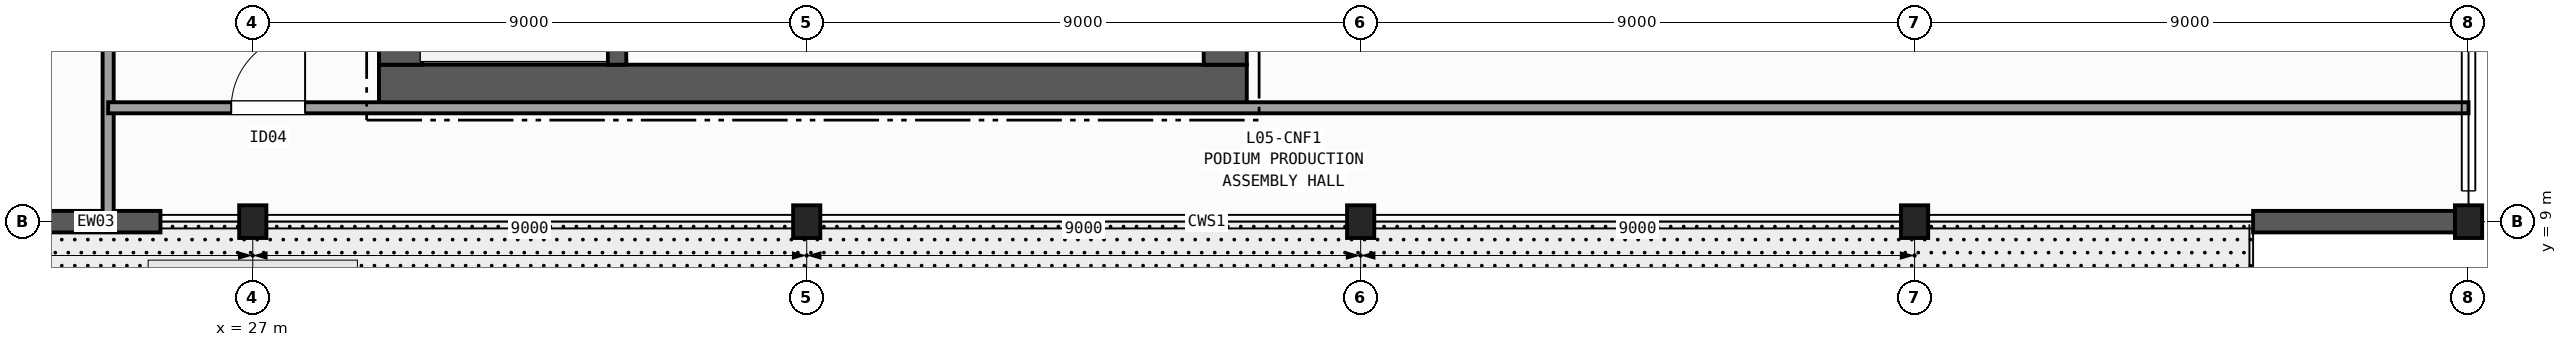
"""IFC4 building model, lengths in metres.
Left out: names, types, materials, properties, quantities, classifications, styles, units other than length and angle.
Written with IfcOpenShell. Run it as: python <this file> out.ifc"""

import sys

from ifc_helpers import new_model, si_unit, direction, frame, frame_2d, origin, origin_2d, place, context, subcontext, project, spatial, rectangle, i_section, extrude, element, fill, save


model = new_model("IFC4")
c1 = context("Model", 3, precision=1e-05, world=origin(), true_north=direction((0.0, 1.0)))
c2 = subcontext(c1, "Body", "Model", "MODEL_VIEW")
j1 = project(units=[si_unit("LENGTHUNIT", "METRE"), si_unit("PLANEANGLEUNIT", "RADIAN")], contexts=[c1])
p1 = place(None, origin())
s1 = spatial("IfcSite", under=j1, at=p1, CompositionType="ELEMENT")
p2 = place(p1, origin())
s2 = spatial("IfcBuilding", under=s1, at=p2, CompositionType="ELEMENT")
p3 = place(p2, frame((0.0, 0.0, 26.0)))
s3 = spatial("IfcBuildingStorey", under=s2, at=p3, CompositionType="ELEMENT", Elevation=26.0)
for number, where, z_axis, x_axis in (
    (1, (27.0, 9.0, 0.0), (0.0, 0.0, 1.0), (1.0, 0.0, 0.0)),
    (2, (36.0, 9.0, 0.0), (0.0, 0.0, 1.0), (1.0, 0.0, 0.0)),
    (3, (45.0, 9.0, 0.0), (0.0, 0.0, 1.0), (1.0, 0.0, 0.0)),
    (4, (54.0, 9.0, 0.0), (0.0, 0.0, 1.0), (1.0, 0.0, 0.0)),
    (5, (63.0, 9.0, 0.0), (0.0, 0.0, 1.0), (1.0, 0.0, 0.0)),
):
    element("IfcColumn", number, at=place(p3, frame(where, z_axis=z_axis, x_axis=x_axis)), inside=s3, PredefinedType="COLUMN", context=c2, shape_type="SweptSolid", body=[
        extrude(i_section(OverallWidth=0.442, OverallDepth=0.531, WebThickness=0.066, FlangeThickness=0.106, FilletRadius=0.015, at=origin_2d()), origin(), (0.0, 0.0, 1.0), 4.8),
    ])
p4 = place(p3, frame((25.5, 9.0, 0.0), z_axis=(0.0, 0.0, 1.0), x_axis=(-1.0, 0.0, 0.0)))
e6 = element("IfcWall", 6, at=p4, inside=s3, PredefinedType="SOLIDWALL", context=c2, shape_type="SweptSolid", body=[
    extrude(rectangle(XDim=5.1, YDim=0.35, at=frame_2d((2.55, 0.0))), origin(), (0.0, 0.0, 1.0), 4.44),
])
p5 = place(p4, frame((2.4, 0.0, 0.0)))
e7 = element("IfcOpeningElement", 7, at=p5, cuts=e6, PredefinedType="OPENING", context=c2, shape_type="SweptSolid", body=[
    extrude(rectangle(XDim=1.2, YDim=2.2, at=frame_2d((0.6, 1.1))), frame((0.0, 0.185, 0.0), z_axis=(0.0, -1.0, 0.0), x_axis=(1.0, 0.0, 0.0)), (0.0, 0.0, 1.0), 0.37),
])
p6 = place(p3, frame((63.0, 9.0, 0.0), z_axis=(0.0, 0.0, 1.0), x_axis=(-1.0, 0.0, 0.0)))
e8 = element("IfcWall", 8, at=p6, inside=s3, PredefinedType="SOLIDWALL", context=c2, shape_type="SweptSolid", body=[
    extrude(rectangle(XDim=3.5, YDim=0.35, at=frame_2d((1.75, 0.0))), origin(), (0.0, 0.0, 1.0), 4.44),
])
p7 = place(p3, frame((29.05, 11.2, 0.0), z_axis=(0.0, 0.0, 1.0), x_axis=(1.0, 0.0, 0.0)))
e9 = element("IfcWall", 9, at=p7, inside=s3, PredefinedType="SHEAR", context=c2, shape_type="SweptSolid", body=[
    extrude(rectangle(XDim=14.1, YDim=0.7, at=frame_2d((7.05, 0.0))), origin(), (0.0, 0.0, 1.0), 4.44),
])
p8 = place(p3, frame((29.4, 24.25, 0.0), z_axis=(0.0, 0.0, 1.0), x_axis=(0.0, -1.0, 0.0)))
e10 = element("IfcWall", 10, at=p8, inside=s3, PredefinedType="SHEAR", context=c2, shape_type="SweptSolid", body=[
    extrude(rectangle(XDim=12.7, YDim=0.7, at=frame_2d((6.35, 0.0))), origin(), (0.0, 0.0, 1.0), 4.44),
])
p9 = place(p8, frame((1.35, 0.0, 0.0)))
e11 = element("IfcOpeningElement", 11, at=p9, cuts=e10, PredefinedType="OPENING", context=c2, shape_type="SweptSolid", body=[
    extrude(rectangle(XDim=1.35, YDim=2.15, at=frame_2d((0.675, 1.075))), frame((0.0, 0.36, 0.0), z_axis=(0.0, -1.0, 0.0), x_axis=(1.0, 0.0, 0.0)), (0.0, 0.0, 1.0), 0.72),
])
p10 = place(p3, frame((42.8, 11.55, 0.0), z_axis=(0.0, 0.0, 1.0), x_axis=(0.0, 1.0, 0.0)))
e12 = element("IfcWall", 12, at=p10, inside=s3, PredefinedType="SHEAR", context=c2, shape_type="SweptSolid", body=[
    extrude(rectangle(XDim=12.7, YDim=0.7, at=frame_2d((6.35, 0.0))), origin(), (0.0, 0.0, 1.0), 4.44),
])
p11 = place(p3, frame((32.92, 11.55, 0.0), z_axis=(0.0, 0.0, 1.0), x_axis=(-0.01331804616, 0.99991131089, 0.0)))
e13 = element("IfcWall", 13, at=p11, inside=s3, PredefinedType="SHEAR", context=c2, shape_type="SweptSolid", body=[
    extrude(rectangle(XDim=9.001, YDim=0.3, at=frame_2d((4.5, 0.0))), origin(), (0.0, 0.0, 1.0), 4.44),
])
p12 = place(p3, frame((24.65, 9.0, 0.0), z_axis=(0.0, 0.0, 1.0), x_axis=(0.0, 1.0, 0.0)))
e14 = element("IfcWall", 14, at=p12, inside=s3, PredefinedType="PARTITIONING", context=c2, shape_type="SweptSolid", body=[
    extrude(rectangle(XDim=19.2, YDim=0.18, at=frame_2d((9.6, 0.0))), origin(), (0.0, 0.0, 1.0), 3.493),
])
p13 = place(p12, frame((5.0, 0.0, 0.0)))
e15 = element("IfcOpeningElement", 15, at=p13, cuts=e14, PredefinedType="OPENING", context=c2, shape_type="SweptSolid", body=[
    extrude(rectangle(XDim=1.4, YDim=2.15, at=frame_2d((0.7, 1.075))), frame((0.0, 0.1, 0.0), z_axis=(0.0, -1.0, 0.0), x_axis=(1.0, 0.0, 0.0)), (0.0, 0.0, 1.0), 0.2),
])
p14 = place(p3, frame((24.65, 10.85, 0.0), z_axis=(0.0, 0.0, 1.0), x_axis=(1.0, 0.0, 0.0)))
e16 = element("IfcWall", 16, at=p14, inside=s3, PredefinedType="PARTITIONING", context=c2, shape_type="SweptSolid", body=[
    extrude(rectangle(XDim=38.35, YDim=0.18, at=frame_2d((19.175, 0.0))), origin(), (0.0, 0.0, 1.0), 2.62),
])
p15 = place(p14, frame((2.0, 0.0, 0.0)))
e17 = element("IfcOpeningElement", 17, at=p15, cuts=e16, PredefinedType="OPENING", context=c2, shape_type="SweptSolid", body=[
    extrude(rectangle(XDim=1.2, YDim=2.15, at=frame_2d((0.6, 1.075))), frame((0.0, 0.1, 0.0), z_axis=(0.0, -1.0, 0.0), x_axis=(1.0, 0.0, 0.0)), (0.0, 0.0, 1.0), 0.2),
])
p16 = place(p15, origin())
e18 = element("IfcDoor", 18, at=p16, inside=s3, OperationType="SINGLE_SWING_RIGHT", PredefinedType="DOOR", context=c2, shape_type="SweptSolid", body=[
    extrude(rectangle(XDim=1.2, YDim=2.15, at=frame_2d((0.6, 1.075))), frame((0.0, 0.025, 0.0), z_axis=(0.0, -1.0, 0.0), x_axis=(1.0, 0.0, 0.0)), (0.0, 0.0, 1.0), 0.05),
])
fill(e17, e18)
save(model, sys.argv[1])
